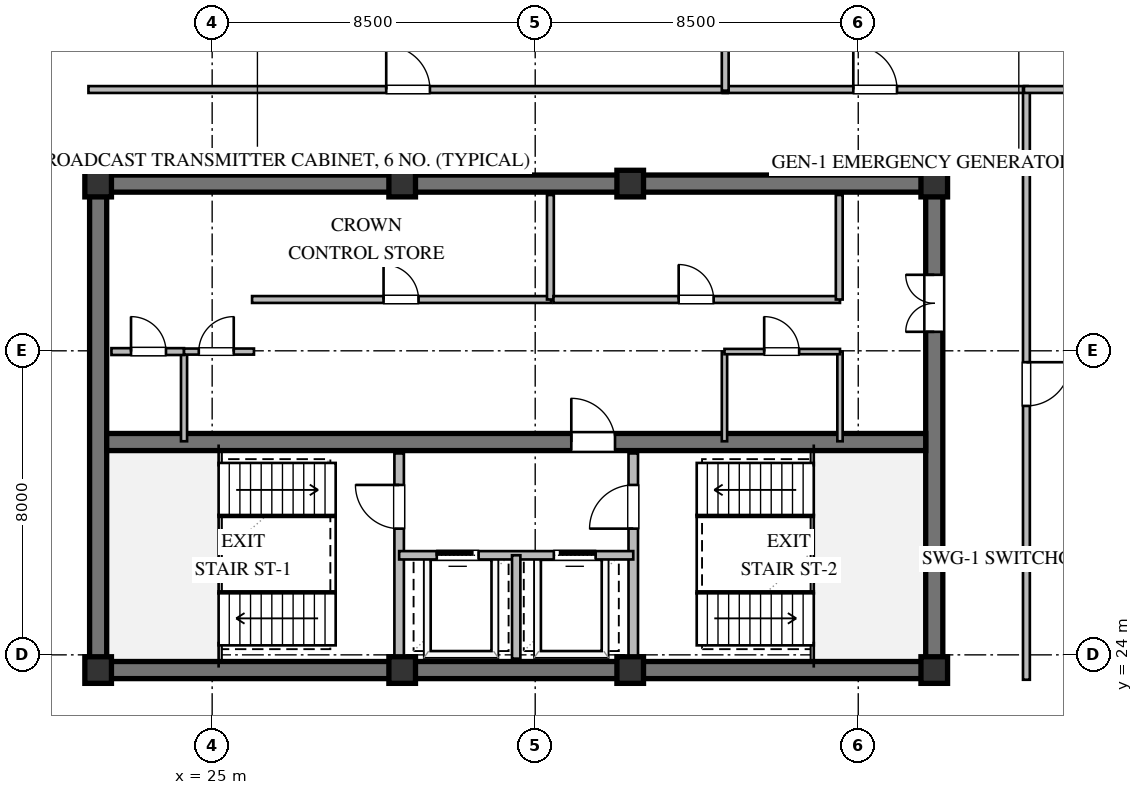
"""IFC4 building model, lengths in metres.
Left out: names, types, materials, properties, quantities, classifications, styles, units other than length and angle.
Written with IfcOpenShell. Run it as: python <this file> out.ifc"""

import sys

from ifc_helpers import new_model, si_unit, direction, frame, frame_2d, origin, origin_2d, place, context, subcontext, project, spatial, rectangle, extrude, element, fill, save


model = new_model("IFC4")
c1 = context("Model", 3, precision=1e-05, world=origin(), true_north=direction((0.0, 1.0)))
c2 = subcontext(c1, "Body", "Model", "MODEL_VIEW")
j1 = project(units=[si_unit("LENGTHUNIT", "METRE"), si_unit("PLANEANGLEUNIT", "RADIAN")], contexts=[c1])
p1 = place(None, origin())
s1 = spatial("IfcSite", under=j1, at=p1, CompositionType="ELEMENT")
p2 = place(p1, origin())
s2 = spatial("IfcBuilding", under=s1, at=p2, CompositionType="ELEMENT")
p3 = place(p2, frame((0.0, 0.0, 304.8)))
s3 = spatial("IfcBuildingStorey", under=s2, at=p3, CompositionType="ELEMENT", Elevation=304.8)
for number, where, z_axis, x_axis in (
    (1, (21.775, 23.6, 0.0), (0.0, 0.0, 1.0), (1.0, 0.0, 0.0)),
    (2, (21.775, 36.4, 0.0), (0.0, 0.0, 1.0), (1.0, 0.0, 0.0)),
):
    element("IfcWall", number, at=place(p3, frame(where, z_axis=z_axis, x_axis=x_axis)), inside=s3, PredefinedType="SHEAR", context=c2, shape_type="SweptSolid", body=[
        extrude(rectangle(XDim=22.45, YDim=0.45, at=frame_2d((11.225, 0.0))), origin(), (0.0, 0.0, 1.0), 3.72),
    ])
p4 = place(p3, frame((22.0, 23.825, 0.0), z_axis=(0.0, 0.0, 1.0), x_axis=(0.0, 1.0, 0.0)))
e3 = element("IfcWall", 3, at=p4, inside=s3, PredefinedType="SHEAR", context=c2, shape_type="SweptSolid", body=[
    extrude(rectangle(XDim=12.35, YDim=0.45, at=frame_2d((6.175, 0.0))), origin(), (0.0, 0.0, 1.0), 3.72),
])
p5 = place(p3, frame((44.0, 23.825, 0.0), z_axis=(0.0, 0.0, 1.0), x_axis=(0.0, 1.0, 0.0)))
e4 = element("IfcWall", 4, at=p5, inside=s3, PredefinedType="SHEAR", context=c2, shape_type="SweptSolid", body=[
    extrude(rectangle(XDim=12.35, YDim=0.45, at=frame_2d((6.175, 0.0))), origin(), (0.0, 0.0, 1.0), 3.72),
])
p6 = place(p5, frame((8.675, 0.0, 0.0)))
e5 = element("IfcOpeningElement", 5, at=p6, cuts=e4, PredefinedType="OPENING", context=c2, shape_type="SweptSolid", body=[
    extrude(rectangle(XDim=1.5, YDim=2.15, at=frame_2d((0.75, 1.075))), frame((0.0, 0.235, 0.0), z_axis=(0.0, -1.0, 0.0), x_axis=(1.0, 0.0, 0.0)), (0.0, 0.0, 1.0), 0.47),
])
p7 = place(p3, frame((22.225, 29.6, 0.0), z_axis=(0.0, 0.0, 1.0), x_axis=(1.0, 0.0, 0.0)))
e6 = element("IfcWall", 6, at=p7, inside=s3, PredefinedType="SHEAR", context=c2, shape_type="SweptSolid", body=[
    extrude(rectangle(XDim=21.55, YDim=0.45, at=frame_2d((10.775, 0.0))), origin(), (0.0, 0.0, 1.0), 3.72),
])
p8 = place(p7, frame((12.225, 0.0, 0.0)))
e7 = element("IfcOpeningElement", 7, at=p8, cuts=e6, PredefinedType="OPENING", context=c2, shape_type="SweptSolid", body=[
    extrude(rectangle(XDim=1.15, YDim=2.1, at=frame_2d((0.575, 1.05))), frame((0.0, 0.235, 0.0), z_axis=(0.0, -1.0, 0.0), x_axis=(1.0, 0.0, 0.0)), (0.0, 0.0, 1.0), 0.47),
])
for number, where, z_axis, x_axis in (
    (8, (22.0, 23.6, 0.0), (0.0, 0.0, 1.0), (1.0, 0.0, 0.0)),
    (9, (30.0, 23.6, 0.0), (0.0, 0.0, 1.0), (1.0, 0.0, 0.0)),
    (10, (36.0, 23.6, 0.0), (0.0, 0.0, 1.0), (1.0, 0.0, 0.0)),
    (11, (44.0, 23.6, 0.0), (0.0, 0.0, 1.0), (1.0, 0.0, 0.0)),
    (12, (44.0, 36.4, 0.0), (0.0, 0.0, 1.0), (1.0, 0.0, 0.0)),
    (13, (36.0, 36.4, 0.0), (0.0, 0.0, 1.0), (1.0, 0.0, 0.0)),
    (14, (30.0, 36.4, 0.0), (0.0, 0.0, 1.0), (1.0, 0.0, 0.0)),
    (15, (22.0, 36.4, 0.0), (0.0, 0.0, 1.0), (1.0, 0.0, 0.0)),
):
    element("IfcColumn", number, at=place(p3, frame(where, z_axis=z_axis, x_axis=x_axis)), inside=s3, PredefinedType="COLUMN", context=c2, shape_type="SweptSolid", body=[
        extrude(rectangle(XDim=0.7, YDim=0.7, at=origin_2d()), origin(), (0.0, 0.0, 1.0), 4.0),
    ])
p9 = place(p3, frame((56.357, 23.077, 0.0), z_axis=(0.0, 0.0, 1.0), x_axis=(-0.814111303181, -0.580708865123, 0.0)))
e16 = element("IfcWall", 16, at=p9, inside=s3, PredefinedType="STANDARD", context=c2, shape_type="SweptSolid", body=[
    extrude(rectangle(XDim=12.481, YDim=0.3, at=frame_2d((6.24, 0.0))), origin(), (0.0, 0.0, 1.0), 3.72),
])
p10 = place(p3, frame((29.92, 23.9, 0.0), z_axis=(0.0, 0.0, 1.0), x_axis=(0.0, 1.0, 0.0)))
e17 = element("IfcWall", 17, at=p10, inside=s3, PredefinedType="SOLIDWALL", context=c2, shape_type="SweptSolid", body=[
    extrude(rectangle(XDim=5.4, YDim=0.25, at=frame_2d((2.7, 0.0))), origin(), (0.0, 0.0, 1.0), 3.72),
])
p11 = place(p10, frame((3.421, 0.0, 0.0)))
e18 = element("IfcOpeningElement", 18, at=p11, cuts=e17, PredefinedType="OPENING", context=c2, shape_type="SweptSolid", body=[
    extrude(rectangle(XDim=1.15, YDim=2.1, at=frame_2d((0.575, 1.05))), frame((0.0, 0.135, 0.0), z_axis=(0.0, -1.0, 0.0), x_axis=(1.0, 0.0, 0.0)), (0.0, 0.0, 1.0), 0.27),
])
p12 = place(p3, frame((36.08, 23.9, 0.0), z_axis=(0.0, 0.0, 1.0), x_axis=(0.0, 1.0, 0.0)))
e19 = element("IfcWall", 19, at=p12, inside=s3, PredefinedType="SOLIDWALL", context=c2, shape_type="SweptSolid", body=[
    extrude(rectangle(XDim=5.4, YDim=0.25, at=frame_2d((2.7, 0.0))), origin(), (0.0, 0.0, 1.0), 3.72),
])
p13 = place(p12, frame((3.421, 0.0, 0.0)))
e20 = element("IfcOpeningElement", 20, at=p13, cuts=e19, PredefinedType="OPENING", context=c2, shape_type="SweptSolid", body=[
    extrude(rectangle(XDim=1.15, YDim=2.1, at=frame_2d((0.575, 1.05))), frame((0.0, 0.135, 0.0), z_axis=(0.0, -1.0, 0.0), x_axis=(1.0, 0.0, 0.0)), (0.0, 0.0, 1.0), 0.27),
])
p14 = place(p3, frame((29.92, 26.62, 0.0), z_axis=(0.0, 0.0, 1.0), x_axis=(1.0, 0.0, 0.0)))
e21 = element("IfcWall", 21, at=p14, inside=s3, PredefinedType="SOLIDWALL", context=c2, shape_type="SweptSolid", body=[
    extrude(rectangle(XDim=6.16, YDim=0.22, at=frame_2d((3.08, 0.0))), origin(), (0.0, 0.0, 1.0), 3.72),
])
p15 = place(p14, frame((0.99, 0.0, 0.0)))
e22 = element("IfcOpeningElement", 22, at=p15, cuts=e21, PredefinedType="OPENING", context=c2, shape_type="SweptSolid", body=[
    extrude(rectangle(XDim=1.1, YDim=2.1, at=frame_2d((0.55, 1.05))), frame((0.0, 0.12, 0.0), z_axis=(0.0, -1.0, 0.0), x_axis=(1.0, 0.0, 0.0)), (0.0, 0.0, 1.0), 0.24),
])
p16 = place(p14, frame((4.07, 0.0, 0.0)))
e23 = element("IfcOpeningElement", 23, at=p16, cuts=e21, PredefinedType="OPENING", context=c2, shape_type="SweptSolid", body=[
    extrude(rectangle(XDim=1.1, YDim=2.1, at=frame_2d((0.55, 1.05))), frame((0.0, 0.12, 0.0), z_axis=(0.0, -1.0, 0.0), x_axis=(1.0, 0.0, 0.0)), (0.0, 0.0, 1.0), 0.24),
])
p17 = place(p3, frame((33.0, 23.9, 0.0), z_axis=(0.0, 0.0, 1.0), x_axis=(0.0, 1.0, 0.0)))
e24 = element("IfcWall", 24, at=p17, inside=s3, PredefinedType="SOLIDWALL", context=c2, shape_type="SweptSolid", body=[
    extrude(rectangle(XDim=2.72, YDim=0.22, at=frame_2d((1.36, 0.0))), origin(), (0.0, 0.0, 1.0), 3.72),
])
p18 = place(p3, frame((26.05, 33.35, 0.0), z_axis=(0.0, 0.0, 1.0), x_axis=(1.0, 0.0, 0.0)))
e25 = element("IfcWall", 25, at=p18, inside=s3, PredefinedType="PARTITIONING", context=c2, shape_type="SweptSolid", body=[
    extrude(rectangle(XDim=7.87, YDim=0.18, at=frame_2d((3.935, 0.0))), origin(), (0.0, 0.0, 1.0), 3.72),
])
p19 = place(p18, frame((3.46, 0.0, 0.0)))
e26 = element("IfcOpeningElement", 26, at=p19, cuts=e25, PredefinedType="OPENING", context=c2, shape_type="SweptSolid", body=[
    extrude(rectangle(XDim=0.92, YDim=2.1, at=frame_2d((0.46, 1.05))), frame((0.0, 0.1, 0.0), z_axis=(0.0, -1.0, 0.0), x_axis=(1.0, 0.0, 0.0)), (0.0, 0.0, 1.0), 0.2),
])
p20 = place(p3, frame((33.9, 33.35, 0.0), z_axis=(0.0, 0.0, 1.0), x_axis=(0.0, 1.0, 0.0)))
e27 = element("IfcWall", 27, at=p20, inside=s3, PredefinedType="PARTITIONING", context=c2, shape_type="SweptSolid", body=[
    extrude(rectangle(XDim=2.75, YDim=0.18, at=frame_2d((1.375, 0.0))), origin(), (0.0, 0.0, 1.0), 3.72),
])
p21 = place(p3, frame((33.98, 33.35, 0.0), z_axis=(0.0, 0.0, 1.0), x_axis=(1.0, 0.0, 0.0)))
e28 = element("IfcWall", 28, at=p21, inside=s3, PredefinedType="PARTITIONING", context=c2, shape_type="SweptSolid", body=[
    extrude(rectangle(XDim=7.54, YDim=0.18, at=frame_2d((3.77, 0.0))), origin(), (0.0, 0.0, 1.0), 3.72),
])
p22 = place(p21, frame((3.295, 0.0, 0.0)))
e29 = element("IfcOpeningElement", 29, at=p22, cuts=e28, PredefinedType="OPENING", context=c2, shape_type="SweptSolid", body=[
    extrude(rectangle(XDim=0.92, YDim=2.1, at=frame_2d((0.46, 1.05))), frame((0.0, 0.1, 0.0), z_axis=(0.0, -1.0, 0.0), x_axis=(1.0, 0.0, 0.0)), (0.0, 0.0, 1.0), 0.2),
])
p23 = place(p3, frame((41.5, 33.35, 0.0), z_axis=(0.0, 0.0, 1.0), x_axis=(0.0, 1.0, 0.0)))
e30 = element("IfcWall", 30, at=p23, inside=s3, PredefinedType="PARTITIONING", context=c2, shape_type="SweptSolid", body=[
    extrude(rectangle(XDim=2.75, YDim=0.18, at=frame_2d((1.375, 0.0))), origin(), (0.0, 0.0, 1.0), 3.72),
])
p24 = place(p3, frame((24.26, 29.62, 0.0), z_axis=(0.0, 0.0, 1.0), x_axis=(0.0, 1.0, 0.0)))
e31 = element("IfcWall", 31, at=p24, inside=s3, PredefinedType="PLUMBINGWALL", context=c2, shape_type="SweptSolid", body=[
    extrude(rectangle(XDim=2.36, YDim=0.16, at=frame_2d((1.18, 0.0))), origin(), (0.0, 0.0, 1.0), 3.72),
])
p25 = place(p3, frame((22.35, 31.98, 0.0), z_axis=(0.0, 0.0, 1.0), x_axis=(1.0, 0.0, 0.0)))
e32 = element("IfcWall", 32, at=p25, inside=s3, PredefinedType="PARTITIONING", context=c2, shape_type="SweptSolid", body=[
    extrude(rectangle(XDim=1.91, YDim=0.18, at=frame_2d((0.955, 0.0))), origin(), (0.0, 0.0, 1.0), 3.72),
])
p26 = place(p25, frame((0.515, 0.0, 0.0)))
e33 = element("IfcOpeningElement", 33, at=p26, cuts=e32, PredefinedType="OPENING", context=c2, shape_type="SweptSolid", body=[
    extrude(rectangle(XDim=0.92, YDim=2.1, at=frame_2d((0.46, 1.05))), frame((0.0, 0.1, 0.0), z_axis=(0.0, -1.0, 0.0), x_axis=(1.0, 0.0, 0.0)), (0.0, 0.0, 1.0), 0.2),
])
p27 = place(p3, frame((24.26, 31.98, 0.0), z_axis=(0.0, 0.0, 1.0), x_axis=(1.0, 0.0, 0.0)))
e34 = element("IfcWall", 34, at=p27, inside=s3, PredefinedType="PLUMBINGWALL", context=c2, shape_type="SweptSolid", body=[
    extrude(rectangle(XDim=1.84, YDim=0.16, at=frame_2d((0.92, 0.0))), origin(), (0.0, 0.0, 1.0), 3.72),
])
p28 = place(p27, frame((0.388, 0.0, 0.0)))
e35 = element("IfcOpeningElement", 35, at=p28, cuts=e34, PredefinedType="OPENING", context=c2, shape_type="SweptSolid", body=[
    extrude(rectangle(XDim=0.92, YDim=2.1, at=frame_2d((0.46, 1.05))), frame((0.0, 0.09, 0.0), z_axis=(0.0, -1.0, 0.0), x_axis=(1.0, 0.0, 0.0)), (0.0, 0.0, 1.0), 0.18),
])
for number, where, z_axis, x_axis in (
    (36, (38.48, 29.62, 0.0), (0.0, 0.0, 1.0), (0.0, 1.0, 0.0)),
    (37, (41.52, 29.62, 0.0), (0.0, 0.0, 1.0), (0.0, 1.0, 0.0)),
):
    element("IfcWall", number, at=place(p3, frame(where, z_axis=z_axis, x_axis=x_axis)), inside=s3, PredefinedType="PARTITIONING", context=c2, shape_type="SweptSolid", body=[
        extrude(rectangle(XDim=2.36, YDim=0.14, at=frame_2d((1.18, 0.0))), origin(), (0.0, 0.0, 1.0), 3.72),
    ])
p29 = place(p3, frame((38.48, 31.98, 0.0), z_axis=(0.0, 0.0, 1.0), x_axis=(1.0, 0.0, 0.0)))
e38 = element("IfcWall", 38, at=p29, inside=s3, PredefinedType="PARTITIONING", context=c2, shape_type="SweptSolid", body=[
    extrude(rectangle(XDim=3.04, YDim=0.14, at=frame_2d((1.52, 0.0))), origin(), (0.0, 0.0, 1.0), 3.72),
])
p30 = place(p29, frame((1.045, 0.0, 0.0)))
e39 = element("IfcOpeningElement", 39, at=p30, cuts=e38, PredefinedType="OPENING", context=c2, shape_type="SweptSolid", body=[
    extrude(rectangle(XDim=0.92, YDim=2.1, at=frame_2d((0.46, 1.05))), frame((0.0, 0.08, 0.0), z_axis=(0.0, -1.0, 0.0), x_axis=(1.0, 0.0, 0.0)), (0.0, 0.0, 1.0), 0.16),
])
p31 = place(p3, frame((21.745, 38.875, 0.0), z_axis=(0.0, 0.0, 1.0), x_axis=(1.0, 0.0, 0.0)))
e40 = element("IfcWall", 40, at=p31, inside=s3, PredefinedType="PARTITIONING", context=c2, shape_type="SweptSolid", body=[
    extrude(rectangle(XDim=16.82, YDim=0.18, at=frame_2d((8.41, 0.0))), origin(), (0.0, 0.0, 1.0), 3.72),
])
p32 = place(p31, frame((7.835, 0.0, 0.0)))
e41 = element("IfcOpeningElement", 41, at=p32, cuts=e40, PredefinedType="OPENING", context=c2, shape_type="SweptSolid", body=[
    extrude(rectangle(XDim=1.15, YDim=2.1, at=frame_2d((0.575, 1.05))), frame((0.0, 0.1, 0.0), z_axis=(0.0, -1.0, 0.0), x_axis=(1.0, 0.0, 0.0)), (0.0, 0.0, 1.0), 0.2),
])
p33 = place(p3, frame((38.435, 38.875, 0.0), z_axis=(0.0, 0.0, 1.0), x_axis=(1.0, 0.0, 0.0)))
e42 = element("IfcWall", 42, at=p33, inside=s3, PredefinedType="PARTITIONING", context=c2, shape_type="SweptSolid", body=[
    extrude(rectangle(XDim=8.02, YDim=0.18, at=frame_2d((4.01, 0.0))), origin(), (0.0, 0.0, 1.0), 3.72),
])
p34 = place(p33, frame((3.435, 0.0, 0.0)))
e43 = element("IfcOpeningElement", 43, at=p34, cuts=e42, PredefinedType="OPENING", context=c2, shape_type="SweptSolid", body=[
    extrude(rectangle(XDim=1.15, YDim=2.1, at=frame_2d((0.575, 1.05))), frame((0.0, 0.1, 0.0), z_axis=(0.0, -1.0, 0.0), x_axis=(1.0, 0.0, 0.0)), (0.0, 0.0, 1.0), 0.2),
])
p35 = place(p3, frame((46.425, 38.905, 0.0), z_axis=(0.0, 0.0, 1.0), x_axis=(0.0, -1.0, 0.0)))
e44 = element("IfcWall", 44, at=p35, inside=s3, PredefinedType="PARTITIONING", context=c2, shape_type="SweptSolid", body=[
    extrude(rectangle(XDim=15.56, YDim=0.18, at=frame_2d((7.78, 0.0))), origin(), (0.0, 0.0, 1.0), 3.72),
])
p36 = place(p35, frame((7.205, 0.0, 0.0)))
e45 = element("IfcOpeningElement", 45, at=p36, cuts=e44, PredefinedType="OPENING", context=c2, shape_type="SweptSolid", body=[
    extrude(rectangle(XDim=1.15, YDim=2.1, at=frame_2d((0.575, 1.05))), frame((0.0, 0.1, 0.0), z_axis=(0.0, -1.0, 0.0), x_axis=(1.0, 0.0, 0.0)), (0.0, 0.0, 1.0), 0.2),
])
p37 = place(p3, frame((38.5, 53.344, 0.0), z_axis=(0.0, 0.0, 1.0), x_axis=(0.0, -1.0, 0.0)))
e46 = element("IfcWall", 46, at=p37, inside=s3, PredefinedType="PARTITIONING", context=c2, shape_type="SweptSolid", body=[
    extrude(rectangle(XDim=14.499, YDim=0.18, at=frame_2d((7.25, 0.0))), origin(), (0.0, 0.0, 1.0), 3.72),
])
p38 = place(p3, frame((59.517, 38.875, 0.0), z_axis=(0.0, 0.0, 1.0), x_axis=(-1.0, 0.0, 0.0)))
e47 = element("IfcWall", 47, at=p38, inside=s3, PredefinedType="PARTITIONING", context=c2, shape_type="SweptSolid", body=[
    extrude(rectangle(XDim=13.157, YDim=0.18, at=frame_2d((6.579, 0.0))), origin(), (0.0, 0.0, 1.0), 3.72),
])
p39 = place(p11, origin())
e48 = element("IfcDoor", 48, at=p39, inside=s3, OperationType="SINGLE_SWING_RIGHT", PredefinedType="DOOR", context=c2, shape_type="SweptSolid", body=[
    extrude(rectangle(XDim=1.15, YDim=2.1, at=frame_2d((0.575, 1.05))), frame((0.0, 0.025, 0.0), z_axis=(0.0, -1.0, 0.0), x_axis=(1.0, 0.0, 0.0)), (0.0, 0.0, 1.0), 0.05),
])
fill(e18, e48)
p40 = place(p13, origin())
e49 = element("IfcDoor", 49, at=p40, inside=s3, OperationType="SINGLE_SWING_LEFT", PredefinedType="DOOR", context=c2, shape_type="SweptSolid", body=[
    extrude(rectangle(XDim=1.15, YDim=2.1, at=frame_2d((0.575, 1.05))), frame((0.0, 0.025, 0.0), z_axis=(0.0, -1.0, 0.0), x_axis=(1.0, 0.0, 0.0)), (0.0, 0.0, 1.0), 0.05),
])
fill(e20, e49)
p41 = place(p15, origin())
e50 = element("IfcDoor", 50, at=p41, inside=s3, OperationType="SLIDING_TO_LEFT", PredefinedType="DOOR", context=c2, shape_type="SweptSolid", body=[
    extrude(rectangle(XDim=1.1, YDim=2.1, at=frame_2d((0.55, 1.05))), frame((0.0, 0.025, 0.0), z_axis=(0.0, -1.0, 0.0), x_axis=(1.0, 0.0, 0.0)), (0.0, 0.0, 1.0), 0.05),
])
fill(e22, e50)
p42 = place(p16, origin())
e51 = element("IfcDoor", 51, at=p42, inside=s3, OperationType="SLIDING_TO_RIGHT", PredefinedType="DOOR", context=c2, shape_type="SweptSolid", body=[
    extrude(rectangle(XDim=1.1, YDim=2.1, at=frame_2d((0.55, 1.05))), frame((0.0, 0.025, 0.0), z_axis=(0.0, -1.0, 0.0), x_axis=(1.0, 0.0, 0.0)), (0.0, 0.0, 1.0), 0.05),
])
fill(e23, e51)
p43 = place(p8, origin())
e52 = element("IfcDoor", 52, at=p43, inside=s3, OperationType="SINGLE_SWING_LEFT", PredefinedType="DOOR", context=c2, shape_type="SweptSolid", body=[
    extrude(rectangle(XDim=1.15, YDim=2.1, at=frame_2d((0.575, 1.05))), frame((0.0, 0.025, 0.0), z_axis=(0.0, -1.0, 0.0), x_axis=(1.0, 0.0, 0.0)), (0.0, 0.0, 1.0), 0.05),
])
fill(e7, e52)
p44 = place(p6, origin())
e53 = element("IfcDoor", 53, at=p44, inside=s3, OperationType="DOUBLE_DOOR_SINGLE_SWING", PredefinedType="DOOR", context=c2, shape_type="SweptSolid", body=[
    extrude(rectangle(XDim=1.5, YDim=2.15, at=frame_2d((0.75, 1.075))), frame((0.0, 0.025, 0.0), z_axis=(0.0, -1.0, 0.0), x_axis=(1.0, 0.0, 0.0)), (0.0, 0.0, 1.0), 0.05),
])
fill(e5, e53)
p45 = place(p19, origin())
e54 = element("IfcDoor", 54, at=p45, inside=s3, OperationType="SINGLE_SWING_LEFT", PredefinedType="DOOR", context=c2, shape_type="SweptSolid", body=[
    extrude(rectangle(XDim=0.92, YDim=2.1, at=frame_2d((0.46, 1.05))), frame((0.0, 0.025, 0.0), z_axis=(0.0, -1.0, 0.0), x_axis=(1.0, 0.0, 0.0)), (0.0, 0.0, 1.0), 0.05),
])
fill(e26, e54)
p46 = place(p22, origin())
e55 = element("IfcDoor", 55, at=p46, inside=s3, OperationType="SINGLE_SWING_LEFT", PredefinedType="DOOR", context=c2, shape_type="SweptSolid", body=[
    extrude(rectangle(XDim=0.92, YDim=2.1, at=frame_2d((0.46, 1.05))), frame((0.0, 0.025, 0.0), z_axis=(0.0, -1.0, 0.0), x_axis=(1.0, 0.0, 0.0)), (0.0, 0.0, 1.0), 0.05),
])
fill(e29, e55)
p47 = place(p26, origin())
e56 = element("IfcDoor", 56, at=p47, inside=s3, OperationType="SINGLE_SWING_LEFT", PredefinedType="DOOR", context=c2, shape_type="SweptSolid", body=[
    extrude(rectangle(XDim=0.92, YDim=2.1, at=frame_2d((0.46, 1.05))), frame((0.0, 0.025, 0.0), z_axis=(0.0, -1.0, 0.0), x_axis=(1.0, 0.0, 0.0)), (0.0, 0.0, 1.0), 0.05),
])
fill(e33, e56)
p48 = place(p28, origin())
e57 = element("IfcDoor", 57, at=p48, inside=s3, OperationType="SINGLE_SWING_RIGHT", PredefinedType="DOOR", context=c2, shape_type="SweptSolid", body=[
    extrude(rectangle(XDim=0.92, YDim=2.1, at=frame_2d((0.46, 1.05))), frame((0.0, 0.025, 0.0), z_axis=(0.0, -1.0, 0.0), x_axis=(1.0, 0.0, 0.0)), (0.0, 0.0, 1.0), 0.05),
])
fill(e35, e57)
p49 = place(p30, origin())
e58 = element("IfcDoor", 58, at=p49, inside=s3, OperationType="SINGLE_SWING_LEFT", PredefinedType="DOOR", context=c2, shape_type="SweptSolid", body=[
    extrude(rectangle(XDim=0.92, YDim=2.1, at=frame_2d((0.46, 1.05))), frame((0.0, 0.025, 0.0), z_axis=(0.0, -1.0, 0.0), x_axis=(1.0, 0.0, 0.0)), (0.0, 0.0, 1.0), 0.05),
])
fill(e39, e58)
p50 = place(p32, origin())
e59 = element("IfcDoor", 59, at=p50, inside=s3, OperationType="SINGLE_SWING_LEFT", PredefinedType="DOOR", context=c2, shape_type="SweptSolid", body=[
    extrude(rectangle(XDim=1.15, YDim=2.1, at=frame_2d((0.575, 1.05))), frame((0.0, 0.025, 0.0), z_axis=(0.0, -1.0, 0.0), x_axis=(1.0, 0.0, 0.0)), (0.0, 0.0, 1.0), 0.05),
])
fill(e41, e59)
p51 = place(p34, origin())
e60 = element("IfcDoor", 60, at=p51, inside=s3, OperationType="SINGLE_SWING_LEFT", PredefinedType="DOOR", context=c2, shape_type="SweptSolid", body=[
    extrude(rectangle(XDim=1.15, YDim=2.1, at=frame_2d((0.575, 1.05))), frame((0.0, 0.025, 0.0), z_axis=(0.0, -1.0, 0.0), x_axis=(1.0, 0.0, 0.0)), (0.0, 0.0, 1.0), 0.05),
])
fill(e43, e60)
p52 = place(p36, origin())
e61 = element("IfcDoor", 61, at=p52, inside=s3, OperationType="SINGLE_SWING_LEFT", PredefinedType="DOOR", context=c2, shape_type="SweptSolid", body=[
    extrude(rectangle(XDim=1.15, YDim=2.1, at=frame_2d((0.575, 1.05))), frame((0.0, 0.025, 0.0), z_axis=(0.0, -1.0, 0.0), x_axis=(1.0, 0.0, 0.0)), (0.0, 0.0, 1.0), 0.05),
])
fill(e45, e61)
save(model, sys.argv[1])
